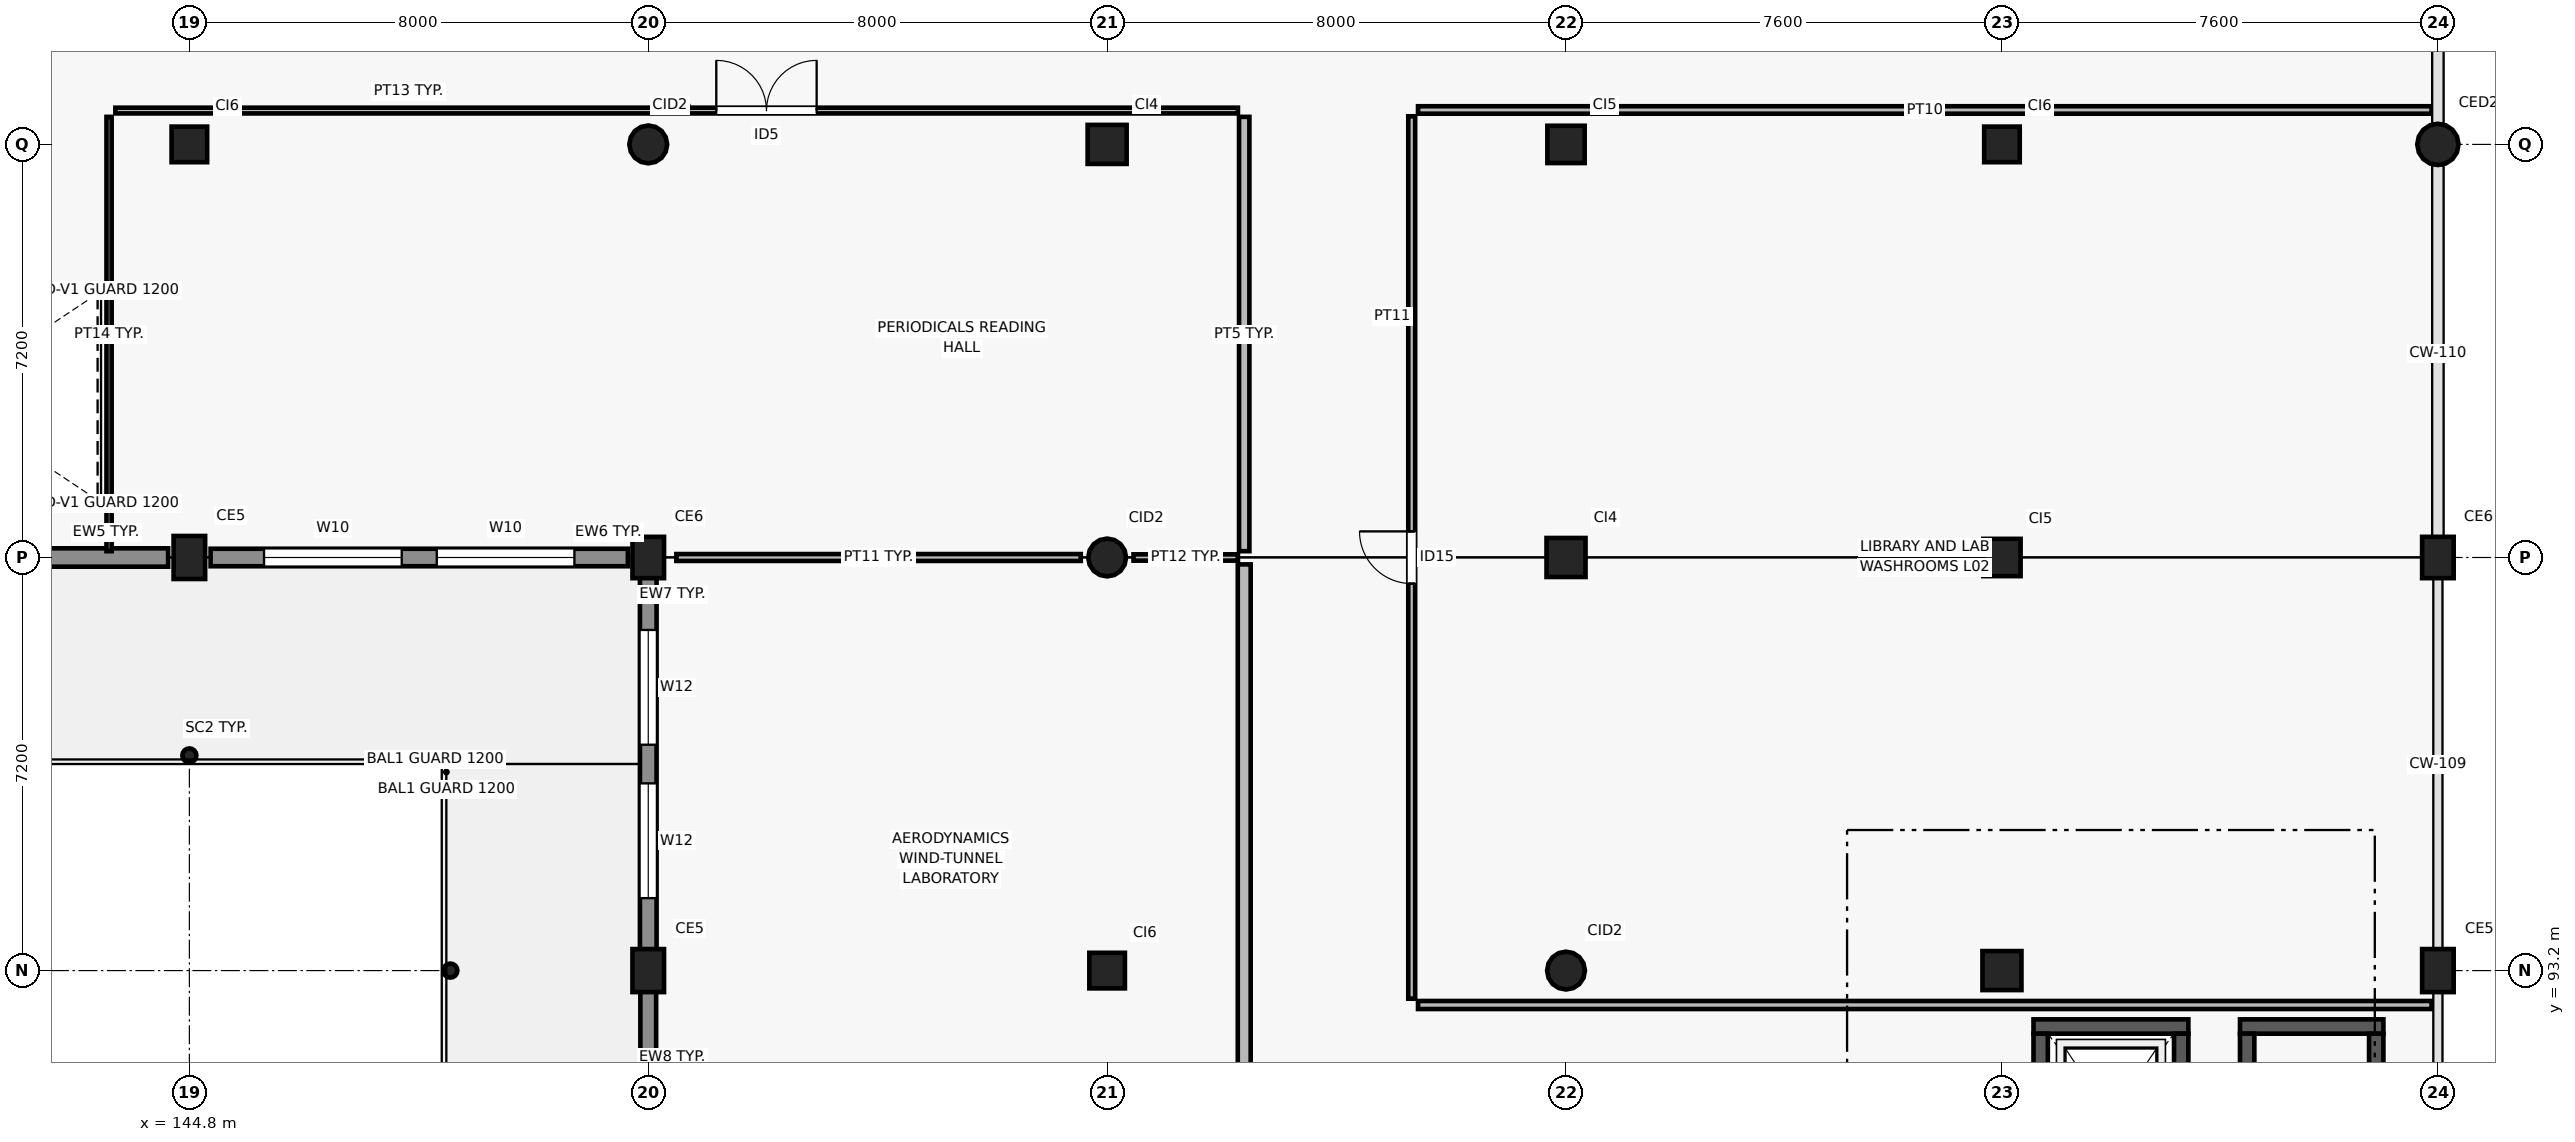
"""IFC4 building model, lengths in metres.
Left out: names, types, materials, properties, quantities, classifications, styles, units other than length and angle.
Written with IfcOpenShell. Run it as: python <this file> out.ifc"""

import sys

from ifc_helpers import new_model, si_unit, direction, frame, frame_2d, origin, origin_2d, place, context, subcontext, project, spatial, rectangle, circle, hollow_circle, extrude, element, fill, save


model = new_model("IFC4")
c1 = context("Model", 3, precision=1e-05, world=origin(), true_north=direction((0.0, 1.0)))
c2 = subcontext(c1, "Body", "Model", "MODEL_VIEW")
j1 = project(units=[si_unit("LENGTHUNIT", "METRE"), si_unit("PLANEANGLEUNIT", "RADIAN")], contexts=[c1])
p1 = place(None, origin())
s1 = spatial("IfcSite", under=j1, at=p1, CompositionType="ELEMENT")
p2 = place(p1, origin())
s2 = spatial("IfcBuilding", under=s1, at=p2, CompositionType="ELEMENT")
p3 = place(p2, frame((0.0, 0.0, 9.0)))
s3 = spatial("IfcBuildingStorey", under=s2, at=p3, CompositionType="ELEMENT", Elevation=9.0)
p4 = place(p3, frame((144.8, 100.4, 0.0), z_axis=(0.0, 0.0, 1.0), x_axis=(1.0, 0.0, 0.0)))
e1 = element("IfcColumn", 1, at=p4, inside=s3, PredefinedType="COLUMN", context=c2, shape_type="SweptSolid", body=[
    extrude(rectangle(XDim=0.75, YDim=0.55, at=origin_2d()), origin(), (0.0, 0.0, 1.0), 4.2),
])
p5 = place(p3, frame((144.8, 107.6, 0.0), z_axis=(0.0, 0.0, 1.0), x_axis=(1.0, 0.0, 0.0)))
e2 = element("IfcColumn", 2, at=p5, inside=s3, PredefinedType="COLUMN", context=c2, shape_type="SweptSolid", body=[
    extrude(rectangle(XDim=0.62, YDim=0.62, at=origin_2d()), origin(), (0.0, 0.0, 1.0), 4.2),
])
p6 = place(p3, frame((152.8, 93.2, 0.0), z_axis=(0.0, 0.0, 1.0), x_axis=(1.0, 0.0, 0.0)))
e3 = element("IfcColumn", 3, at=p6, inside=s3, PredefinedType="COLUMN", context=c2, shape_type="SweptSolid", body=[
    extrude(rectangle(XDim=0.75, YDim=0.55, at=origin_2d()), origin(), (0.0, 0.0, 1.0), 4.2),
])
p7 = place(p3, frame((152.8, 100.4, 0.0), z_axis=(0.0, 0.0, 1.0), x_axis=(1.0, 0.0, 0.0)))
e4 = element("IfcColumn", 4, at=p7, inside=s3, PredefinedType="COLUMN", context=c2, shape_type="SweptSolid", body=[
    extrude(rectangle(XDim=0.72, YDim=0.55, at=origin_2d()), origin(), (0.0, 0.0, 1.0), 4.2),
])
p8 = place(p3, frame((152.8, 107.6, 0.0), z_axis=(0.0, 0.0, 1.0), x_axis=(1.0, 0.0, 0.0)))
e5 = element("IfcColumn", 5, at=p8, inside=s3, PredefinedType="COLUMN", context=c2, shape_type="SweptSolid", body=[
    extrude(circle(Radius=0.33, at=origin_2d()), origin(), (0.0, 0.0, 1.0), 4.2),
])
p9 = place(p3, frame((160.8, 93.2, 0.0), z_axis=(0.0, 0.0, 1.0), x_axis=(1.0, 0.0, 0.0)))
e6 = element("IfcColumn", 6, at=p9, inside=s3, PredefinedType="COLUMN", context=c2, shape_type="SweptSolid", body=[
    extrude(rectangle(XDim=0.62, YDim=0.62, at=origin_2d()), origin(), (0.0, 0.0, 1.0), 4.2),
])
p10 = place(p3, frame((160.8, 100.4, 0.0), z_axis=(0.0, 0.0, 1.0), x_axis=(1.0, 0.0, 0.0)))
e7 = element("IfcColumn", 7, at=p10, inside=s3, PredefinedType="COLUMN", context=c2, shape_type="SweptSolid", body=[
    extrude(circle(Radius=0.33, at=origin_2d()), origin(), (0.0, 0.0, 1.0), 4.2),
])
p11 = place(p3, frame((160.8, 107.6, 0.0), z_axis=(0.0, 0.0, 1.0), x_axis=(1.0, 0.0, 0.0)))
e8 = element("IfcColumn", 8, at=p11, inside=s3, PredefinedType="COLUMN", context=c2, shape_type="SweptSolid", body=[
    extrude(rectangle(XDim=0.68, YDim=0.68, at=origin_2d()), origin(), (0.0, 0.0, 1.0), 4.2),
])
p12 = place(p3, frame((168.8, 93.2, 0.0), z_axis=(0.0, 0.0, 1.0), x_axis=(1.0, 0.0, 0.0)))
e9 = element("IfcColumn", 9, at=p12, inside=s3, PredefinedType="COLUMN", context=c2, shape_type="SweptSolid", body=[
    extrude(circle(Radius=0.33, at=origin_2d()), origin(), (0.0, 0.0, 1.0), 4.2),
])
p13 = place(p3, frame((168.8, 100.4, 0.0), z_axis=(0.0, 0.0, 1.0), x_axis=(1.0, 0.0, 0.0)))
e10 = element("IfcColumn", 10, at=p13, inside=s3, PredefinedType="COLUMN", context=c2, shape_type="SweptSolid", body=[
    extrude(rectangle(XDim=0.68, YDim=0.68, at=origin_2d()), origin(), (0.0, 0.0, 1.0), 4.2),
])
p14 = place(p3, frame((168.8, 107.6, 0.0), z_axis=(0.0, 0.0, 1.0), x_axis=(1.0, 0.0, 0.0)))
e11 = element("IfcColumn", 11, at=p14, inside=s3, PredefinedType="COLUMN", context=c2, shape_type="SweptSolid", body=[
    extrude(rectangle(XDim=0.65, YDim=0.65, at=origin_2d()), origin(), (0.0, 0.0, 1.0), 4.2),
])
p15 = place(p3, frame((176.4, 93.2, 0.0), z_axis=(0.0, 0.0, 1.0), x_axis=(1.0, 0.0, 0.0)))
e12 = element("IfcColumn", 12, at=p15, inside=s3, PredefinedType="COLUMN", context=c2, shape_type="SweptSolid", body=[
    extrude(rectangle(XDim=0.68, YDim=0.68, at=origin_2d()), origin(), (0.0, 0.0, 1.0), 4.2),
])
p16 = place(p3, frame((176.4, 100.4, 0.0), z_axis=(0.0, 0.0, 1.0), x_axis=(1.0, 0.0, 0.0)))
e13 = element("IfcColumn", 13, at=p16, inside=s3, PredefinedType="COLUMN", context=c2, shape_type="SweptSolid", body=[
    extrude(rectangle(XDim=0.65, YDim=0.65, at=origin_2d()), origin(), (0.0, 0.0, 1.0), 4.2),
])
p17 = place(p3, frame((176.4, 107.6, 0.0), z_axis=(0.0, 0.0, 1.0), x_axis=(1.0, 0.0, 0.0)))
e14 = element("IfcColumn", 14, at=p17, inside=s3, PredefinedType="COLUMN", context=c2, shape_type="SweptSolid", body=[
    extrude(rectangle(XDim=0.62, YDim=0.62, at=origin_2d()), origin(), (0.0, 0.0, 1.0), 4.2),
])
p18 = place(p3, frame((184.0, 93.2, 0.0), z_axis=(0.0, 0.0, 1.0), x_axis=(1.0, 0.0, 0.0)))
e15 = element("IfcColumn", 15, at=p18, inside=s3, PredefinedType="COLUMN", context=c2, shape_type="SweptSolid", body=[
    extrude(rectangle(XDim=0.75, YDim=0.55, at=origin_2d()), origin(), (0.0, 0.0, 1.0), 4.2),
])
p19 = place(p3, frame((184.0, 100.4, 0.0), z_axis=(0.0, 0.0, 1.0), x_axis=(1.0, 0.0, 0.0)))
e16 = element("IfcColumn", 16, at=p19, inside=s3, PredefinedType="COLUMN", context=c2, shape_type="SweptSolid", body=[
    extrude(rectangle(XDim=0.72, YDim=0.55, at=origin_2d()), origin(), (0.0, 0.0, 1.0), 4.2),
])
p20 = place(p3, frame((184.0, 107.6, 0.0), z_axis=(0.0, 0.0, 1.0), x_axis=(1.0, 0.0, 0.0)))
e17 = element("IfcColumn", 17, at=p20, inside=s3, PredefinedType="COLUMN", context=c2, shape_type="SweptSolid", body=[
    extrude(circle(Radius=0.36, at=origin_2d()), origin(), (0.0, 0.0, 1.0), 4.2),
])
for number, where, z_axis, x_axis in (
    (18, (144.8, 96.95, 0.0), (0.0, 0.0, 1.0), (1.0, 0.0, 0.0)),
    (19, (149.35, 93.2, 0.0), (0.0, 0.0, 1.0), (1.0, 0.0, 0.0)),
):
    element("IfcColumn", number, at=place(p3, frame(where, z_axis=z_axis, x_axis=x_axis)), inside=s3, PredefinedType="COLUMN", context=c2, shape_type="SweptSolid", body=[
        extrude(hollow_circle(Radius=0.122, WallThickness=0.01, at=origin_2d()), origin(), (0.0, 0.0, 1.0), 4.2),
    ])
p21 = place(p3, frame((137.17, 100.4, 0.0), z_axis=(0.0, 0.0, 1.0), x_axis=(1.0, 0.0, 0.0)))
e20 = element("IfcWall", 20, at=p21, inside=s3, PredefinedType="SOLIDWALL", context=c2, shape_type="SweptSolid", body=[
    extrude(rectangle(XDim=7.26, YDim=0.32, at=frame_2d((3.63, 0.0))), origin(), (0.0, 0.0, 1.0), 3.27),
])
p22 = place(p21, frame((1.383, 0.0, 0.9)))
e21 = element("IfcOpeningElement", 21, at=p22, cuts=e20, PredefinedType="OPENING", context=c2, shape_type="SweptSolid", body=[
    extrude(rectangle(XDim=1.2, YDim=1.8, at=frame_2d((0.6, 0.9))), frame((0.0, 0.17, 0.0), z_axis=(0.0, -1.0, 0.0), x_axis=(1.0, 0.0, 0.0)), (0.0, 0.0, 1.0), 0.34),
])
p23 = place(p21, frame((3.647, 0.0, 0.9)))
e22 = element("IfcOpeningElement", 22, at=p23, cuts=e20, PredefinedType="OPENING", context=c2, shape_type="SweptSolid", body=[
    extrude(rectangle(XDim=1.2, YDim=1.8, at=frame_2d((0.6, 0.9))), frame((0.0, 0.17, 0.0), z_axis=(0.0, -1.0, 0.0), x_axis=(1.0, 0.0, 0.0)), (0.0, 0.0, 1.0), 0.34),
])
p24 = place(p3, frame((145.17, 100.4, 0.0), z_axis=(0.0, 0.0, 1.0), x_axis=(1.0, 0.0, 0.0)))
e23 = element("IfcWall", 23, at=p24, inside=s3, PredefinedType="SOLIDWALL", context=c2, shape_type="SweptSolid", body=[
    extrude(rectangle(XDim=7.275, YDim=0.305, at=frame_2d((3.638, 0.0))), origin(), (0.0, 0.0, 1.0), 3.32),
])
p25 = place(p24, frame((0.932, 0.0, 0.9)))
e24 = element("IfcOpeningElement", 24, at=p25, cuts=e23, PredefinedType="OPENING", context=c2, shape_type="SweptSolid", body=[
    extrude(rectangle(XDim=2.4, YDim=1.5, at=frame_2d((1.2, 0.75))), frame((0.0, 0.162, 0.0), z_axis=(0.0, -1.0, 0.0), x_axis=(1.0, 0.0, 0.0)), (0.0, 0.0, 1.0), 0.325),
])
p26 = place(p24, frame((3.943, 0.0, 0.9)))
e25 = element("IfcOpeningElement", 25, at=p26, cuts=e23, PredefinedType="OPENING", context=c2, shape_type="SweptSolid", body=[
    extrude(rectangle(XDim=2.4, YDim=1.5, at=frame_2d((1.2, 0.75))), frame((0.0, 0.162, 0.0), z_axis=(0.0, -1.0, 0.0), x_axis=(1.0, 0.0, 0.0)), (0.0, 0.0, 1.0), 0.325),
])
p27 = place(p3, frame((152.8, 100.13, 0.0), z_axis=(0.0, 0.0, 1.0), x_axis=(0.0, -1.0, 0.0)))
e26 = element("IfcWall", 26, at=p27, inside=s3, PredefinedType="SOLIDWALL", context=c2, shape_type="SweptSolid", body=[
    extrude(rectangle(XDim=6.66, YDim=0.29, at=frame_2d((3.33, 0.0))), origin(), (0.0, 0.0, 1.0), 3.46),
])
p28 = place(p27, frame((0.993, 0.0, 0.9)))
e27 = element("IfcOpeningElement", 27, at=p28, cuts=e26, PredefinedType="OPENING", context=c2, shape_type="SweptSolid", body=[
    extrude(rectangle(XDim=2.0, YDim=1.5, at=frame_2d((1.0, 0.75))), frame((0.0, 0.155, 0.0), z_axis=(0.0, -1.0, 0.0), x_axis=(1.0, 0.0, 0.0)), (0.0, 0.0, 1.0), 0.31),
])
p29 = place(p27, frame((3.667, 0.0, 0.9)))
e28 = element("IfcOpeningElement", 28, at=p29, cuts=e26, PredefinedType="OPENING", context=c2, shape_type="SweptSolid", body=[
    extrude(rectangle(XDim=2.0, YDim=1.5, at=frame_2d((1.0, 0.75))), frame((0.0, 0.155, 0.0), z_axis=(0.0, -1.0, 0.0), x_axis=(1.0, 0.0, 0.0)), (0.0, 0.0, 1.0), 0.31),
])
p30 = place(p3, frame((152.8, 92.93, 0.0), z_axis=(0.0, 0.0, 1.0), x_axis=(0.0, -1.0, 0.0)))
e29 = element("IfcWall", 29, at=p30, inside=s3, PredefinedType="SOLIDWALL", context=c2, shape_type="SweptSolid", body=[
    extrude(rectangle(XDim=6.635, YDim=0.275, at=frame_2d((3.317, 0.0))), origin(), (0.0, 0.0, 1.0), 3.4),
])
p31 = place(p30, frame((2.743, 0.0, 0.0)))
e30 = element("IfcOpeningElement", 30, at=p31, cuts=e29, PredefinedType="OPENING", context=c2, shape_type="SweptSolid", body=[
    extrude(rectangle(XDim=1.15, YDim=2.2, at=frame_2d((0.575, 1.1))), frame((0.0, 0.147, 0.0), z_axis=(0.0, -1.0, 0.0), x_axis=(1.0, 0.0, 0.0)), (0.0, 0.0, 1.0), 0.295),
])
p32 = place(p3, frame((176.95, 92.225, 0.0), z_axis=(0.0, 0.0, 1.0), x_axis=(1.0, 0.0, 0.0)))
e31 = element("IfcWall", 31, at=p32, inside=s3, PredefinedType="SHEAR", context=c2, shape_type="SweptSolid", body=[
    extrude(rectangle(XDim=2.7, YDim=0.25, at=frame_2d((1.35, 0.0))), origin(), (0.0, 0.0, 1.0), 3.92),
])
for number, where, z_axis, x_axis in (
    (32, (177.075, 89.2, 0.0), (0.0, 0.0, 1.0), (0.0, 1.0, 0.0)),
    (33, (179.525, 89.2, 0.0), (0.0, 0.0, 1.0), (0.0, 1.0, 0.0)),
):
    element("IfcWall", number, at=place(p3, frame(where, z_axis=z_axis, x_axis=x_axis)), inside=s3, PredefinedType="SHEAR", context=c2, shape_type="SweptSolid", body=[
        extrude(rectangle(XDim=2.9, YDim=0.25, at=frame_2d((1.45, 0.0))), origin(), (0.0, 0.0, 1.0), 3.92),
    ])
p33 = place(p3, frame((180.55, 92.225, 0.0), z_axis=(0.0, 0.0, 1.0), x_axis=(1.0, 0.0, 0.0)))
e34 = element("IfcWall", 34, at=p33, inside=s3, PredefinedType="SHEAR", context=c2, shape_type="SweptSolid", body=[
    extrude(rectangle(XDim=2.5, YDim=0.25, at=frame_2d((1.25, 0.0))), origin(), (0.0, 0.0, 1.0), 3.92),
])
for number, where, z_axis, x_axis in (
    (35, (180.675, 89.2, 0.0), (0.0, 0.0, 1.0), (0.0, 1.0, 0.0)),
    (36, (182.925, 89.2, 0.0), (0.0, 0.0, 1.0), (0.0, 1.0, 0.0)),
):
    element("IfcWall", number, at=place(p3, frame(where, z_axis=z_axis, x_axis=x_axis)), inside=s3, PredefinedType="SHEAR", context=c2, shape_type="SweptSolid", body=[
        extrude(rectangle(XDim=2.9, YDim=0.25, at=frame_2d((1.45, 0.0))), origin(), (0.0, 0.0, 1.0), 3.92),
    ])
p34 = place(p3, frame((153.29, 100.4, 0.0), z_axis=(0.0, 0.0, 1.0), x_axis=(1.0, 0.0, 0.0)))
e37 = element("IfcWall", 37, at=p34, inside=s3, PredefinedType="PARTITIONING", context=c2, shape_type="SweptSolid", body=[
    extrude(rectangle(XDim=7.05, YDim=0.12, at=frame_2d((3.525, 0.0))), origin(), (0.0, 0.0, 1.0), 3.37),
])
p35 = place(p3, frame((161.26, 100.4, 0.0), z_axis=(0.0, 0.0, 1.0), x_axis=(1.0, 0.0, 0.0)))
e38 = element("IfcWall", 38, at=p35, inside=s3, PredefinedType="PARTITIONING", context=c2, shape_type="SweptSolid", body=[
    extrude(rectangle(XDim=1.82, YDim=0.11, at=frame_2d((0.91, 0.0))), origin(), (0.0, 0.0, 1.0), 3.42),
])
p36 = place(p3, frame((143.51, 108.19, 0.0), z_axis=(0.0, 0.0, 1.0), x_axis=(1.0, 0.0, 0.0)))
e39 = element("IfcWall", 39, at=p36, inside=s3, PredefinedType="PARTITIONING", context=c2, shape_type="SweptSolid", body=[
    extrude(rectangle(XDim=19.57, YDim=0.1, at=frame_2d((9.785, 0.0))), origin(), (0.0, 0.0, 1.0), 3.9),
])
p37 = place(p36, frame((10.476, 0.0, 0.0)))
e40 = element("IfcOpeningElement", 40, at=p37, cuts=e39, PredefinedType="OPENING", context=c2, shape_type="SweptSolid", body=[
    extrude(rectangle(XDim=1.75, YDim=2.25, at=frame_2d((0.875, 1.125))), frame((0.0, 0.06, 0.0), z_axis=(0.0, -1.0, 0.0), x_axis=(1.0, 0.0, 0.0)), (0.0, 0.0, 1.0), 0.12),
])
p38 = place(p3, frame((143.4, 100.51, 0.0), z_axis=(0.0, 0.0, 1.0), x_axis=(0.0, 1.0, 0.0)))
e41 = element("IfcWall", 41, at=p38, inside=s3, PredefinedType="PARTITIONING", context=c2, shape_type="SweptSolid", body=[
    extrude(rectangle(XDim=7.57, YDim=0.09, at=frame_2d((3.785, 0.0))), origin(), (0.0, 0.0, 1.0), 3.9),
])
p39 = place(p3, frame((163.19, 100.51, 0.0), z_axis=(0.0, 0.0, 1.0), x_axis=(0.0, 1.0, 0.0)))
e42 = element("IfcWall", 42, at=p39, inside=s3, PredefinedType="PARTITIONING", context=c2, shape_type="SweptSolid", body=[
    extrude(rectangle(XDim=7.57, YDim=0.18, at=frame_2d((3.785, 0.0))), origin(), (0.0, 0.0, 1.0), 3.9),
])
p40 = place(p3, frame((163.19, 62.31, 0.0), z_axis=(0.0, 0.0, 1.0), x_axis=(0.0, 1.0, 0.0)))
e43 = element("IfcWall", 43, at=p40, inside=s3, PredefinedType="PARTITIONING", context=c2, shape_type="SweptSolid", body=[
    extrude(rectangle(XDim=37.97, YDim=0.225, at=frame_2d((18.985, 0.0))), origin(), (0.0, 0.0, 1.0), 3.9),
])
p41 = place(p40, frame((18.31, 0.0, 0.0)))
e44 = element("IfcOpeningElement", 44, at=p41, cuts=e43, PredefinedType="OPENING", context=c2, shape_type="SweptSolid", body=[
    extrude(rectangle(XDim=1.35, YDim=2.2, at=frame_2d((0.675, 1.1))), frame((0.0, 0.123, 0.0), z_axis=(0.0, -1.0, 0.0), x_axis=(1.0, 0.0, 0.0)), (0.0, 0.0, 1.0), 0.245),
])
p42 = place(p3, frame((166.22, 92.6, 0.0), z_axis=(0.0, 0.0, 1.0), x_axis=(1.0, 0.0, 0.0)))
e45 = element("IfcWall", 45, at=p42, inside=s3, PredefinedType="PARTITIONING", context=c2, shape_type="SweptSolid", body=[
    extrude(rectangle(XDim=17.67, YDim=0.14, at=frame_2d((8.835, 0.0))), origin(), (0.0, 0.0, 1.0), 3.9),
])
p43 = place(p3, frame((166.22, 108.2, 0.0), z_axis=(0.0, 0.0, 1.0), x_axis=(1.0, 0.0, 0.0)))
e46 = element("IfcWall", 46, at=p43, inside=s3, PredefinedType="PARTITIONING", context=c2, shape_type="SweptSolid", body=[
    extrude(rectangle(XDim=17.67, YDim=0.13, at=frame_2d((8.835, 0.0))), origin(), (0.0, 0.0, 1.0), 3.9),
])
p44 = place(p3, frame((166.11, 92.71, 0.0), z_axis=(0.0, 0.0, 1.0), x_axis=(0.0, 1.0, 0.0)))
e47 = element("IfcWall", 47, at=p44, inside=s3, PredefinedType="PARTITIONING", context=c2, shape_type="SweptSolid", body=[
    extrude(rectangle(XDim=15.38, YDim=0.12, at=frame_2d((7.69, 0.0))), origin(), (0.0, 0.0, 1.0), 3.9),
])
p45 = place(p44, frame((7.235, 0.0, 0.0)))
e48 = element("IfcOpeningElement", 48, at=p45, cuts=e47, PredefinedType="OPENING", context=c2, shape_type="SweptSolid", body=[
    extrude(rectangle(XDim=0.91, YDim=2.1, at=frame_2d((0.455, 1.05))), frame((0.0, 0.07, 0.0), z_axis=(0.0, -1.0, 0.0), x_axis=(1.0, 0.0, 0.0)), (0.0, 0.0, 1.0), 0.14),
])
p46 = place(p25, origin())
e49 = element("IfcWindow", 49, at=p46, inside=s3, PartitioningType="SINGLE_PANEL", PredefinedType="WINDOW", context=c2, shape_type="SweptSolid", body=[
    extrude(rectangle(XDim=2.4, YDim=1.5, at=frame_2d((1.2, 0.75))), frame((0.0, 0.03, 0.0), z_axis=(0.0, -1.0, 0.0), x_axis=(1.0, 0.0, 0.0)), (0.0, 0.0, 1.0), 0.06),
])
fill(e24, e49)
p47 = place(p26, origin())
e50 = element("IfcWindow", 50, at=p47, inside=s3, PartitioningType="SINGLE_PANEL", PredefinedType="WINDOW", context=c2, shape_type="SweptSolid", body=[
    extrude(rectangle(XDim=2.4, YDim=1.5, at=frame_2d((1.2, 0.75))), frame((0.0, 0.03, 0.0), z_axis=(0.0, -1.0, 0.0), x_axis=(1.0, 0.0, 0.0)), (0.0, 0.0, 1.0), 0.06),
])
fill(e25, e50)
p48 = place(p28, origin())
e51 = element("IfcWindow", 51, at=p48, inside=s3, PartitioningType="SINGLE_PANEL", PredefinedType="WINDOW", context=c2, shape_type="SweptSolid", body=[
    extrude(rectangle(XDim=2.0, YDim=1.5, at=frame_2d((1.0, 0.75))), frame((0.0, 0.03, 0.0), z_axis=(0.0, -1.0, 0.0), x_axis=(1.0, 0.0, 0.0)), (0.0, 0.0, 1.0), 0.06),
])
fill(e27, e51)
p49 = place(p29, origin())
e52 = element("IfcWindow", 52, at=p49, inside=s3, PartitioningType="SINGLE_PANEL", PredefinedType="WINDOW", context=c2, shape_type="SweptSolid", body=[
    extrude(rectangle(XDim=2.0, YDim=1.5, at=frame_2d((1.0, 0.75))), frame((0.0, 0.03, 0.0), z_axis=(0.0, -1.0, 0.0), x_axis=(1.0, 0.0, 0.0)), (0.0, 0.0, 1.0), 0.06),
])
fill(e28, e52)
p50 = place(p37, origin())
e53 = element("IfcDoor", 53, at=p50, inside=s3, OperationType="DOUBLE_DOOR_SINGLE_SWING", PredefinedType="DOOR", context=c2, shape_type="SweptSolid", body=[
    extrude(rectangle(XDim=1.75, YDim=2.25, at=frame_2d((0.875, 1.125))), frame((0.0, 0.025, 0.0), z_axis=(0.0, -1.0, 0.0), x_axis=(1.0, 0.0, 0.0)), (0.0, 0.0, 1.0), 0.05),
])
fill(e40, e53)
p51 = place(p45, origin())
e54 = element("IfcDoor", 54, at=p51, inside=s3, OperationType="SINGLE_SWING_RIGHT", PredefinedType="DOOR", context=c2, shape_type="SweptSolid", body=[
    extrude(rectangle(XDim=0.91, YDim=2.1, at=frame_2d((0.455, 1.05))), frame((0.0, 0.025, 0.0), z_axis=(0.0, -1.0, 0.0), x_axis=(1.0, 0.0, 0.0)), (0.0, 0.0, 1.0), 0.05),
])
fill(e48, e54)
save(model, sys.argv[1])
